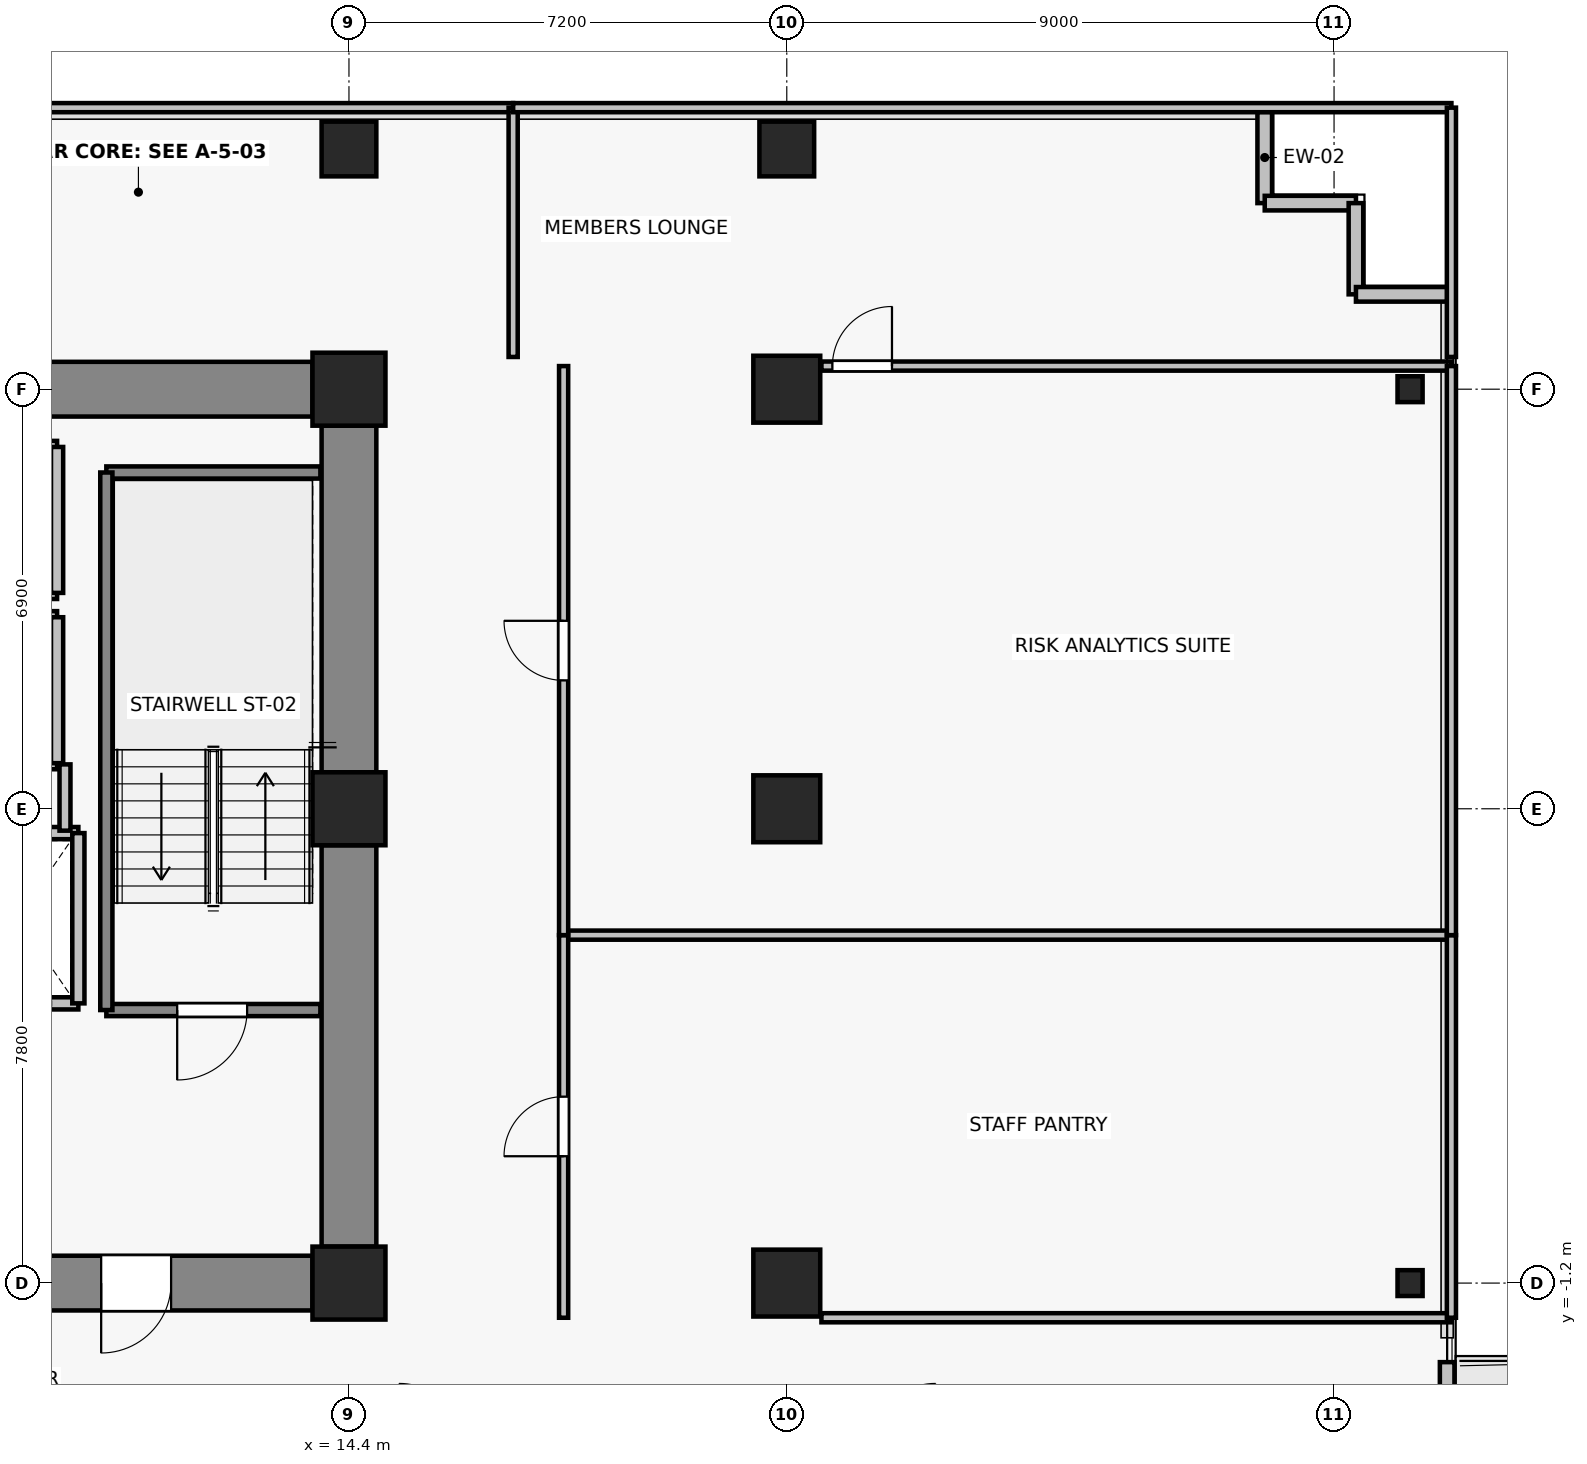
"""IFC4 building model, lengths in metres.
Left out: names, types, materials, properties, quantities, classifications, styles, units other than length and angle.
Written with IfcOpenShell. Run it as: python <this file> out.ifc"""

import sys

from ifc_helpers import new_model, si_unit, direction, frame, frame_2d, origin, origin_2d, place, context, subcontext, project, spatial, rectangle, i_section, extrude, source, transform, mapped, element, fill, save


model = new_model("IFC4")
c1 = context("Model", 3, precision=1e-05, world=origin(), true_north=direction((0.0, 1.0)))
c2 = subcontext(c1, "Body", "Model", "MODEL_VIEW")
j1 = project(units=[si_unit("LENGTHUNIT", "METRE"), si_unit("PLANEANGLEUNIT", "RADIAN")], contexts=[c1])
p1 = place(None, origin())
s1 = spatial("IfcSite", under=j1, at=p1, CompositionType="ELEMENT")
p2 = place(p1, origin())
s2 = spatial("IfcBuilding", under=s1, at=p2, CompositionType="ELEMENT")
p3 = place(p2, frame((0.0, 0.0, 63.7)))
s3 = spatial("IfcBuildingStorey", under=s2, at=p3, CompositionType="ELEMENT", Elevation=63.7)
for number, where, z_axis, x_axis in (
    (1, (14.4, -1.2, 0.0), (0.0, 0.0, 1.0), (1.0, 0.0, 0.0)),
    (2, (14.4, 6.6, 0.0), (0.0, 0.0, 1.0), (1.0, 0.0, 0.0)),
    (3, (14.4, 13.5, 0.0), (0.0, 0.0, 1.0), (1.0, 0.0, 0.0)),
):
    element("IfcColumn", number, at=place(p3, frame(where, z_axis=z_axis, x_axis=x_axis)), inside=s3, PredefinedType="COLUMN", context=c2, shape_type="SweptSolid", body=[
        extrude(rectangle(XDim=1.2, YDim=1.2, at=origin_2d()), origin(), (0.0, 0.0, 1.0), 3.3),
    ])
for number, where, z_axis, x_axis in (
    (4, (21.6, -1.2, 0.0), (0.0, 0.0, 1.0), (1.0, 0.0, 0.0)),
    (5, (21.6, 6.6, 0.0), (0.0, 0.0, 1.0), (1.0, 0.0, 0.0)),
    (6, (21.6, 13.5, 0.0), (0.0, 0.0, 1.0), (1.0, 0.0, 0.0)),
):
    element("IfcColumn", number, at=place(p3, frame(where, z_axis=z_axis, x_axis=x_axis)), inside=s3, PredefinedType="COLUMN", context=c2, shape_type="SweptSolid", body=[
        extrude(rectangle(XDim=1.1, YDim=1.1, at=origin_2d()), origin(), (0.0, 0.0, 1.0), 3.3),
    ])
for number, where, z_axis, x_axis in (
    (7, (14.4, 17.45, 0.0), (0.0, 0.0, 1.0), (1.0, 0.0, 0.0)),
    (8, (21.6, 17.45, 0.0), (0.0, 0.0, 1.0), (1.0, 0.0, 0.0)),
):
    element("IfcColumn", number, at=place(p3, frame(where, z_axis=z_axis, x_axis=x_axis)), inside=s3, PredefinedType="COLUMN", context=c2, shape_type="SweptSolid", body=[
        extrude(rectangle(XDim=0.9, YDim=0.9, at=origin_2d()), origin(), (0.0, 0.0, 1.0), 3.3),
    ])
for number, where, z_axis, x_axis in (
    (9, (31.85, -1.2, 0.0), (0.0, 0.0, 1.0), (1.0, 0.0, 0.0)),
    (10, (31.85, 13.5, 0.0), (0.0, 0.0, 1.0), (1.0, 0.0, 0.0)),
):
    element("IfcColumn", number, at=place(p3, frame(where, z_axis=z_axis, x_axis=x_axis)), inside=s3, PredefinedType="COLUMN", context=c2, shape_type="SweptSolid", body=[
        extrude(i_section(OverallWidth=0.412, OverallDepth=0.425, WebThickness=0.026, FlangeThickness=0.039, FilletRadius=0.015, at=origin_2d()), origin(), (0.0, 0.0, 1.0), 3.3),
    ])
p4 = place(p3, frame((7.8, 13.5, 0.0), z_axis=(0.0, 0.0, 1.0), x_axis=(1.0, 0.0, 0.0)))
e11 = element("IfcWall", 11, at=p4, inside=s3, PredefinedType="SHEAR", context=c2, shape_type="SweptSolid", body=[
    extrude(rectangle(XDim=6.0, YDim=0.9, at=frame_2d((3.0, 0.0))), origin(), (0.0, 0.0, 1.0), 3.075),
])
p5 = place(p3, frame((14.4, -0.6, 0.0), z_axis=(0.0, 0.0, 1.0), x_axis=(0.0, 1.0, 0.0)))
e12 = element("IfcWall", 12, at=p5, inside=s3, PredefinedType="SHEAR", context=c2, shape_type="SweptSolid", body=[
    extrude(rectangle(XDim=6.6, YDim=0.9, at=frame_2d((3.3, 0.0))), origin(), (0.0, 0.0, 1.0), 3.075),
])
p6 = place(p3, frame((14.4, 7.2, 0.0), z_axis=(0.0, 0.0, 1.0), x_axis=(0.0, 1.0, 0.0)))
e13 = element("IfcWall", 13, at=p6, inside=s3, PredefinedType="SHEAR", context=c2, shape_type="SweptSolid", body=[
    extrude(rectangle(XDim=5.7, YDim=0.9, at=frame_2d((2.85, 0.0))), origin(), (0.0, 0.0, 1.0), 3.075),
])
p7 = place(p3, frame((13.8, -1.2, 0.0), z_axis=(0.0, 0.0, 1.0), x_axis=(-1.0, 0.0, 0.0)))
e14 = element("IfcWall", 14, at=p7, inside=s3, PredefinedType="SHEAR", context=c2, shape_type="SweptSolid", body=[
    extrude(rectangle(XDim=6.0, YDim=0.9, at=frame_2d((3.0, 0.0))), origin(), (0.0, 0.0, 1.0), 3.075),
])
p8 = place(p7, frame((2.325, 0.0, 0.0)))
e15 = element("IfcOpeningElement", 15, at=p8, cuts=e14, PredefinedType="OPENING", context=c2, shape_type="SweptSolid", body=[
    extrude(rectangle(XDim=1.15, YDim=2.15, at=frame_2d((0.575, 1.075))), frame((0.0, 0.46, 0.0), z_axis=(0.0, -1.0, 0.0), x_axis=(1.0, 0.0, 0.0)), (0.0, 0.0, 1.0), 0.92),
])
p9 = place(p3, frame((32.46, -2.5, 0.0), z_axis=(0.0, 0.0, 1.0), x_axis=(0.0, -1.0, 0.0)))
e16 = element("IfcWall", 16, at=p9, inside=s3, PredefinedType="SOLIDWALL", context=c2, shape_type="SweptSolid", body=[
    extrude(rectangle(XDim=5.8, YDim=0.24, at=frame_2d((2.9, 0.0))), origin(), (0.0, 0.0, 1.0), 3.075),
])
p10 = place(p9, frame((1.566, 0.0, 0.0)))
e17 = element("IfcOpeningElement", 17, at=p10, cuts=e16, PredefinedType="OPENING", context=c2, shape_type="SweptSolid", body=[
    extrude(rectangle(XDim=1.0, YDim=2.2, at=frame_2d((0.5, 1.1))), frame((0.0, 0.13, 0.0), z_axis=(0.0, -1.0, 0.0), x_axis=(1.0, 0.0, 0.0)), (0.0, 0.0, 1.0), 0.26),
])
p11 = place(p9, frame((2.916, 0.0, 0.85)))
e18 = element("IfcOpeningElement", 18, at=p11, cuts=e16, PredefinedType="OPENING", context=c2, shape_type="SweptSolid", body=[
    extrude(rectangle(XDim=0.9, YDim=1.35, at=frame_2d((0.45, 0.675))), frame((0.0, 0.13, 0.0), z_axis=(0.0, -1.0, 0.0), x_axis=(1.0, 0.0, 0.0)), (0.0, 0.0, 1.0), 0.26),
])
for number, where, z_axis, x_axis in (
    (19, (29.46, 16.56, 0.0), (0.0, 0.0, 1.0), (0.0, 1.0, 0.0)),
    (20, (30.96, 16.56, 0.0), (0.0, 0.0, 1.0), (-1.0, 0.0, 0.0)),
    (21, (30.96, 15.06, 0.0), (0.0, 0.0, 1.0), (0.0, 1.0, 0.0)),
    (22, (32.46, 15.06, 0.0), (0.0, 0.0, 1.0), (-1.0, 0.0, 0.0)),
):
    element("IfcWall", number, at=place(p3, frame(where, z_axis=z_axis, x_axis=x_axis)), inside=s3, PredefinedType="SOLIDWALL", context=c2, shape_type="SweptSolid", body=[
        extrude(rectangle(XDim=1.5, YDim=0.24, at=frame_2d((0.75, 0.0))), origin(), (0.0, 0.0, 1.0), 3.075),
    ])
p12 = place(p3, frame((9.95, 3.4, 0.0), z_axis=(0.0, 0.0, 1.0), x_axis=(-1.0, 0.0, 0.0)))
e23 = element("IfcWall", 23, at=p12, inside=s3, PredefinedType="SOLIDWALL", context=c2, shape_type="SweptSolid", body=[
    extrude(rectangle(XDim=2.0, YDim=0.2, at=frame_2d((1.0, 0.0))), origin(), (0.0, 0.0, 1.0), 3.075),
])
p13 = place(p12, frame((0.45, 0.0, 0.0)))
e24 = element("IfcOpeningElement", 24, at=p13, cuts=e23, PredefinedType="OPENING", context=c2, shape_type="SweptSolid", body=[
    extrude(rectangle(XDim=1.1, YDim=2.2, at=frame_2d((0.55, 1.1))), frame((0.0, 0.11, 0.0), z_axis=(0.0, -1.0, 0.0), x_axis=(1.0, 0.0, 0.0)), (0.0, 0.0, 1.0), 0.22),
])
p14 = place(p3, frame((7.95, 6.2, 0.0), z_axis=(0.0, 0.0, 1.0), x_axis=(1.0, 0.0, 0.0)))
e25 = element("IfcWall", 25, at=p14, inside=s3, PredefinedType="SOLIDWALL", context=c2, shape_type="SweptSolid", body=[
    extrude(rectangle(XDim=2.0, YDim=0.2, at=frame_2d((1.0, 0.0))), origin(), (0.0, 0.0, 1.0), 3.075),
])
p15 = place(p3, frame((9.95, 6.2, 0.0), z_axis=(0.0, 0.0, 1.0), x_axis=(0.0, -1.0, 0.0)))
e26 = element("IfcWall", 26, at=p15, inside=s3, PredefinedType="SOLIDWALL", context=c2, shape_type="SweptSolid", body=[
    extrude(rectangle(XDim=2.8, YDim=0.2, at=frame_2d((1.4, 0.0))), origin(), (0.0, 0.0, 1.0), 3.075),
])
for number, where, z_axis, x_axis in (
    (27, (9.6, 7.35, 0.0), (0.0, 0.0, 1.0), (-1.0, 0.0, 0.0)),
    (28, (7.4, 9.75, 0.0), (0.0, 0.0, 1.0), (1.0, 0.0, 0.0)),
):
    element("IfcWall", number, at=place(p3, frame(where, z_axis=z_axis, x_axis=x_axis)), inside=s3, PredefinedType="SOLIDWALL", context=c2, shape_type="SweptSolid", body=[
        extrude(rectangle(XDim=2.2, YDim=0.2, at=frame_2d((1.1, 0.0))), origin(), (0.0, 0.0, 1.0), 2.465),
    ])
p16 = place(p3, frame((9.6, 9.75, 0.0), z_axis=(0.0, 0.0, 1.0), x_axis=(0.0, -1.0, 0.0)))
e29 = element("IfcWall", 29, at=p16, inside=s3, PredefinedType="SOLIDWALL", context=c2, shape_type="SweptSolid", body=[
    extrude(rectangle(XDim=2.4, YDim=0.2, at=frame_2d((1.2, 0.0))), origin(), (0.0, 0.0, 1.0), 3.075),
])
for number, where, z_axis, x_axis in (
    (30, (9.6, 10.15, 0.0), (0.0, 0.0, 1.0), (-1.0, 0.0, 0.0)),
    (31, (7.4, 12.55, 0.0), (0.0, 0.0, 1.0), (1.0, 0.0, 0.0)),
):
    element("IfcWall", number, at=place(p3, frame(where, z_axis=z_axis, x_axis=x_axis)), inside=s3, PredefinedType="SOLIDWALL", context=c2, shape_type="SweptSolid", body=[
        extrude(rectangle(XDim=2.2, YDim=0.2, at=frame_2d((1.1, 0.0))), origin(), (0.0, 0.0, 1.0), 2.465),
    ])
p17 = place(p3, frame((9.6, 12.55, 0.0), z_axis=(0.0, 0.0, 1.0), x_axis=(0.0, -1.0, 0.0)))
e32 = element("IfcWall", 32, at=p17, inside=s3, PredefinedType="SOLIDWALL", context=c2, shape_type="SweptSolid", body=[
    extrude(rectangle(XDim=2.4, YDim=0.2, at=frame_2d((1.2, 0.0))), origin(), (0.0, 0.0, 1.0), 3.075),
])
p18 = place(p3, frame((13.93, 3.29, 0.0), z_axis=(0.0, 0.0, 1.0), x_axis=(-1.0, 0.0, 0.0)))
e33 = element("IfcWall", 33, at=p18, inside=s3, PredefinedType="SOLIDWALL", context=c2, shape_type="SweptSolid", body=[
    extrude(rectangle(XDim=3.52, YDim=0.2, at=frame_2d((1.76, 0.0))), origin(), (0.0, 0.0, 1.0), 3.075),
])
p19 = place(p18, frame((1.205, 0.0, 0.0)))
e34 = element("IfcOpeningElement", 34, at=p19, cuts=e33, PredefinedType="OPENING", context=c2, shape_type="SweptSolid", body=[
    extrude(rectangle(XDim=1.15, YDim=2.15, at=frame_2d((0.575, 1.075))), frame((0.0, 0.11, 0.0), z_axis=(0.0, -1.0, 0.0), x_axis=(1.0, 0.0, 0.0)), (0.0, 0.0, 1.0), 0.22),
])
p20 = place(p3, frame((10.41, 12.13, 0.0), z_axis=(0.0, 0.0, 1.0), x_axis=(1.0, 0.0, 0.0)))
e35 = element("IfcWall", 35, at=p20, inside=s3, PredefinedType="SOLIDWALL", context=c2, shape_type="SweptSolid", body=[
    extrude(rectangle(XDim=3.52, YDim=0.2, at=frame_2d((1.76, 0.0))), origin(), (0.0, 0.0, 1.0), 3.075),
])
p21 = place(p3, frame((10.41, 3.29, 0.0), z_axis=(0.0, 0.0, 1.0), x_axis=(0.0, 1.0, 0.0)))
e36 = element("IfcWall", 36, at=p21, inside=s3, PredefinedType="SOLIDWALL", context=c2, shape_type="SweptSolid", body=[
    extrude(rectangle(XDim=8.84, YDim=0.2, at=frame_2d((4.42, 0.0))), origin(), (0.0, 0.0, 1.0), 3.075),
])
p22 = place(p3, frame((9.73, 7.33, 0.0), z_axis=(0.0, 0.0, 1.0), x_axis=(0.0, -1.0, 0.0)))
e37 = element("IfcWall", 37, at=p22, inside=s3, PredefinedType="PARTITIONING", context=c2, shape_type="SweptSolid", body=[
    extrude(rectangle(XDim=1.09, YDim=0.18, at=frame_2d((0.545, 0.0))), origin(), (0.0, 0.0, 1.0), 3.075),
])
p23 = place(p3, frame((32.53, -1.77, 0.0), z_axis=(0.0, 0.0, 1.0), x_axis=(-1.0, 0.0, 0.0)))
e38 = element("IfcWall", 38, at=p23, inside=s3, PredefinedType="PARTITIONING", context=c2, shape_type="SweptSolid", body=[
    extrude(rectangle(XDim=10.36, YDim=0.15, at=frame_2d((5.18, 0.0))), origin(), (0.0, 0.0, 1.0), 2.465),
])
p24 = place(p3, frame((17.93, 4.522, 0.0), z_axis=(0.0, 0.0, 1.0), x_axis=(1.0, 0.0, 0.0)))
e39 = element("IfcWall", 39, at=p24, inside=s3, PredefinedType="PARTITIONING", context=c2, shape_type="SweptSolid", body=[
    extrude(rectangle(XDim=14.6, YDim=0.15, at=frame_2d((7.3, 0.0))), origin(), (0.0, 0.0, 1.0), 2.465),
])
p25 = place(p3, frame((17.93, -1.77, 0.0), z_axis=(0.0, 0.0, 1.0), x_axis=(0.0, 1.0, 0.0)))
e40 = element("IfcWall", 40, at=p25, inside=s3, PredefinedType="PARTITIONING", context=c2, shape_type="SweptSolid", body=[
    extrude(rectangle(XDim=6.292, YDim=0.15, at=frame_2d((3.146, 0.0))), origin(), (0.0, 0.0, 1.0), 2.465),
])
p26 = place(p25, frame((2.656, 0.0, 0.0)))
e41 = element("IfcOpeningElement", 41, at=p26, cuts=e40, PredefinedType="OPENING", context=c2, shape_type="SweptSolid", body=[
    extrude(rectangle(XDim=0.98, YDim=2.15, at=frame_2d((0.49, 1.075))), frame((0.0, 0.085, 0.0), z_axis=(0.0, -1.0, 0.0), x_axis=(1.0, 0.0, 0.0)), (0.0, 0.0, 1.0), 0.17),
])
p27 = place(p3, frame((32.53, 4.522, 0.0), z_axis=(0.0, 0.0, 1.0), x_axis=(0.0, -1.0, 0.0)))
e42 = element("IfcWall", 42, at=p27, inside=s3, PredefinedType="PARTITIONING", context=c2, shape_type="SweptSolid", body=[
    extrude(rectangle(XDim=6.292, YDim=0.15, at=frame_2d((3.146, 0.0))), origin(), (0.0, 0.0, 1.0), 3.075),
])
p28 = place(p3, frame((22.17, 13.88, 0.0), z_axis=(0.0, 0.0, 1.0), x_axis=(1.0, 0.0, 0.0)))
e43 = element("IfcWall", 43, at=p28, inside=s3, PredefinedType="PARTITIONING", context=c2, shape_type="SweptSolid", body=[
    extrude(rectangle(XDim=10.36, YDim=0.15, at=frame_2d((5.18, 0.0))), origin(), (0.0, 0.0, 1.0), 3.075),
])
p29 = place(p28, frame((0.18, 0.0, 0.0)))
e44 = element("IfcOpeningElement", 44, at=p29, cuts=e43, PredefinedType="OPENING", context=c2, shape_type="SweptSolid", body=[
    extrude(rectangle(XDim=0.98, YDim=2.15, at=frame_2d((0.49, 1.075))), frame((0.0, 0.085, 0.0), z_axis=(0.0, -1.0, 0.0), x_axis=(1.0, 0.0, 0.0)), (0.0, 0.0, 1.0), 0.17),
])
p30 = place(p3, frame((17.93, 4.522, 0.0), z_axis=(0.0, 0.0, 1.0), x_axis=(0.0, 1.0, 0.0)))
e45 = element("IfcWall", 45, at=p30, inside=s3, PredefinedType="PARTITIONING", context=c2, shape_type="SweptSolid", body=[
    extrude(rectangle(XDim=9.358, YDim=0.15, at=frame_2d((4.679, 0.0))), origin(), (0.0, 0.0, 1.0), 2.465),
])
p31 = place(p30, frame((4.189, 0.0, 0.0)))
e46 = element("IfcOpeningElement", 46, at=p31, cuts=e45, PredefinedType="OPENING", context=c2, shape_type="SweptSolid", body=[
    extrude(rectangle(XDim=0.98, YDim=2.15, at=frame_2d((0.49, 1.075))), frame((0.0, 0.085, 0.0), z_axis=(0.0, -1.0, 0.0), x_axis=(1.0, 0.0, 0.0)), (0.0, 0.0, 1.0), 0.17),
])
p32 = place(p3, frame((32.53, 13.88, 0.0), z_axis=(0.0, 0.0, 1.0), x_axis=(0.0, -1.0, 0.0)))
e47 = element("IfcWall", 47, at=p32, inside=s3, PredefinedType="PARTITIONING", context=c2, shape_type="SweptSolid", body=[
    extrude(rectangle(XDim=9.358, YDim=0.15, at=frame_2d((4.679, 0.0))), origin(), (0.0, 0.0, 1.0), 3.075),
])
p33 = place(p3, frame((-28.53, 18.13, 0.0), z_axis=(0.0, 0.0, 1.0), x_axis=(1.0, 0.0, 0.0)))
e48 = element("IfcWall", 48, at=p33, inside=s3, PredefinedType="PARTITIONING", context=c2, shape_type="SweptSolid", body=[
    extrude(rectangle(XDim=45.63, YDim=0.15, at=frame_2d((22.815, 0.0))), origin(), (0.0, 0.0, 1.0), 3.075),
])
p34 = place(p3, frame((17.1, 18.13, 0.0), z_axis=(0.0, 0.0, 1.0), x_axis=(0.0, -1.0, 0.0)))
e49 = element("IfcWall", 49, at=p34, inside=s3, PredefinedType="PARTITIONING", context=c2, shape_type="SweptSolid", body=[
    extrude(rectangle(XDim=4.1, YDim=0.15, at=frame_2d((2.05, 0.0))), origin(), (0.0, 0.0, 1.0), 2.465),
])
p35 = place(p3, frame((17.1, 18.13, 0.0), z_axis=(0.0, 0.0, 1.0), x_axis=(1.0, 0.0, 0.0)))
e50 = element("IfcWall", 50, at=p35, inside=s3, PredefinedType="PARTITIONING", context=c2, shape_type="SweptSolid", body=[
    extrude(rectangle(XDim=15.43, YDim=0.15, at=frame_2d((7.715, 0.0))), origin(), (0.0, 0.0, 1.0), 3.075),
])
p36 = place(p3, frame((32.53, 18.13, 0.0), z_axis=(0.0, 0.0, 1.0), x_axis=(0.0, -1.0, 0.0)))
e51 = element("IfcWall", 51, at=p36, inside=s3, PredefinedType="PARTITIONING", context=c2, shape_type="SweptSolid", body=[
    extrude(rectangle(XDim=4.1, YDim=0.15, at=frame_2d((2.05, 0.0))), origin(), (0.0, 0.0, 1.0), 3.075),
])
m1 = source(origin(), c2, "Body", "SweptSolid", [
    extrude(rectangle(XDim=1.15, YDim=2.15, at=frame_2d((0.575, 1.075))), frame((0.0, 0.025, 0.0), z_axis=(0.0, -1.0, 0.0), x_axis=(1.0, 0.0, 0.0)), (0.0, 0.0, 1.0), 0.05),
])
p37 = place(p19, origin())
e52 = element("IfcDoor", 52, at=p37, inside=s3, OperationType="SINGLE_SWING_RIGHT", PredefinedType="DOOR", context=c2, shape_type="MappedRepresentation", body=[
    mapped(m1, transform((0.0, 0.0, 0.0), x_axis=(1.0, 0.0, 0.0), y_axis=(0.0, 1.0, 0.0), z_axis=(0.0, 0.0, 1.0), scale=1.0)),
])
fill(e34, e52)
p38 = place(p8, origin())
e53 = element("IfcDoor", 53, at=p38, inside=s3, OperationType="SINGLE_SWING_RIGHT", PredefinedType="DOOR", context=c2, shape_type="MappedRepresentation", body=[
    mapped(m1, transform((0.0, 0.0, 0.0), x_axis=(1.0, 0.0, 0.0), y_axis=(0.0, 1.0, 0.0), z_axis=(0.0, 0.0, 1.0), scale=1.0)),
])
fill(e15, e53)
m2 = source(origin(), c2, "Body", "SweptSolid", [
    extrude(rectangle(XDim=0.98, YDim=2.15, at=frame_2d((0.49, 1.075))), frame((0.0, 0.025, 0.0), z_axis=(0.0, -1.0, 0.0), x_axis=(1.0, 0.0, 0.0)), (0.0, 0.0, 1.0), 0.05),
])
p39 = place(p26, origin())
e54 = element("IfcDoor", 54, at=p39, inside=s3, OperationType="SINGLE_SWING_LEFT", PredefinedType="DOOR", context=c2, shape_type="MappedRepresentation", body=[
    mapped(m2, transform((0.0, 0.0, 0.0), x_axis=(1.0, 0.0, 0.0), y_axis=(0.0, 1.0, 0.0), z_axis=(0.0, 0.0, 1.0), scale=1.0)),
])
fill(e41, e54)
p40 = place(p31, origin())
e55 = element("IfcDoor", 55, at=p40, inside=s3, OperationType="SINGLE_SWING_RIGHT", PredefinedType="DOOR", context=c2, shape_type="MappedRepresentation", body=[
    mapped(m2, transform((0.0, 0.0, 0.0), x_axis=(1.0, 0.0, 0.0), y_axis=(0.0, 1.0, 0.0), z_axis=(0.0, 0.0, 1.0), scale=1.0)),
])
fill(e46, e55)
p41 = place(p29, origin())
e56 = element("IfcDoor", 56, at=p41, inside=s3, OperationType="SINGLE_SWING_RIGHT", PredefinedType="DOOR", context=c2, shape_type="MappedRepresentation", body=[
    mapped(m2, transform((0.0, 0.0, 0.0), x_axis=(1.0, 0.0, 0.0), y_axis=(0.0, 1.0, 0.0), z_axis=(0.0, 0.0, 1.0), scale=1.0)),
])
fill(e44, e56)
save(model, sys.argv[1])
